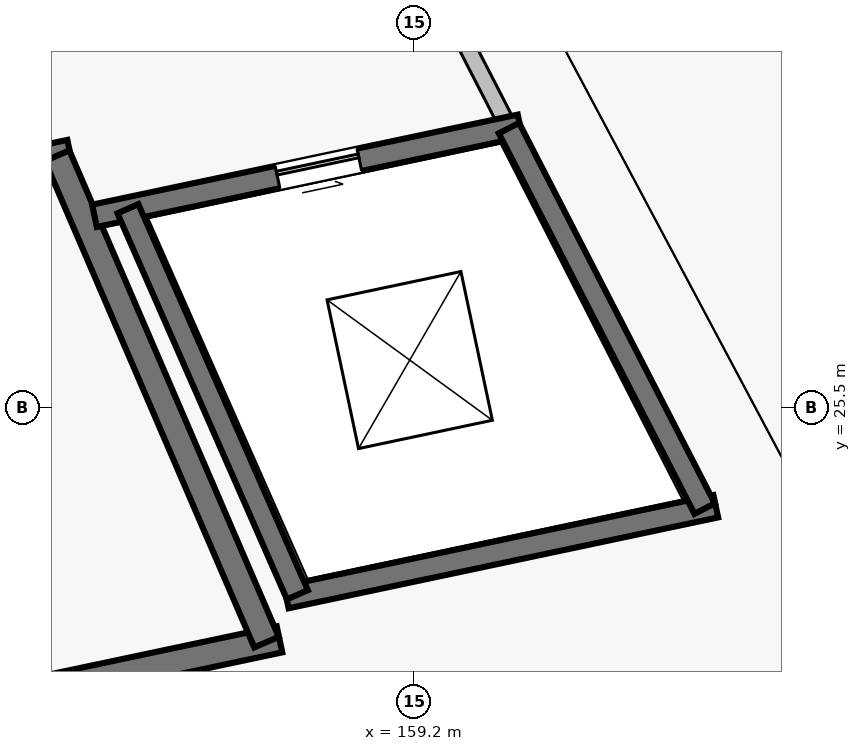
"""IFC4 building model, lengths in metres.
Left out: names, types, materials, properties, quantities, classifications, styles, units other than length and angle.
Written with IfcOpenShell. Run it as: python <this file> out.ifc"""

import sys

from ifc_helpers import new_model, si_unit, direction, frame, frame_2d, origin, place, context, subcontext, project, spatial, rectangle, extrude, element, fill, save


model = new_model("IFC4")
c1 = context("Model", 3, precision=1e-05, world=origin(), true_north=direction((0.0, 1.0)))
c2 = subcontext(c1, "Body", "Model", "MODEL_VIEW")
j1 = project(units=[si_unit("LENGTHUNIT", "METRE"), si_unit("PLANEANGLEUNIT", "RADIAN")], contexts=[c1])
p1 = place(None, origin())
s1 = spatial("IfcSite", under=j1, at=p1, CompositionType="ELEMENT")
p2 = place(p1, origin())
s2 = spatial("IfcBuilding", under=s1, at=p2, CompositionType="ELEMENT")
p3 = place(p2, origin())
s3 = spatial("IfcBuildingStorey", under=s2, at=p3, CompositionType="ELEMENT", Elevation=0.0)
p4 = place(p3, frame((142.896, 26.357, 0.0), z_axis=(0.0, 0.0, 1.0), x_axis=(0.978345203961, 0.206979858648, 0.0)))
e1 = element("IfcWall", 1, at=p4, inside=s3, PredefinedType="SHEAR", context=c2, shape_type="SweptSolid", body=[
    extrude(rectangle(XDim=12.044, YDim=0.35, at=frame_2d((6.022, 0.0))), origin(), (0.0, 0.0, 1.0), 5.5),
])
p5 = place(p4, frame((0.475, 0.0, 0.0)))
e2 = element("IfcOpeningElement", 2, at=p5, cuts=e1, PredefinedType="OPENING", context=c2, shape_type="SweptSolid", body=[
    extrude(rectangle(XDim=1.8, YDim=2.2, at=frame_2d((0.9, 1.1))), frame((0.0, 0.185, 0.0), z_axis=(0.0, -1.0, 0.0), x_axis=(1.0, 0.0, 0.0)), (0.0, 0.0, 1.0), 0.37),
])
p6 = place(p3, frame((144.65, 19.746, 0.0), z_axis=(0.0, 0.0, 1.0), x_axis=(0.978345119536, 0.206980257705, 0.0)))
e3 = element("IfcWall", 3, at=p6, inside=s3, PredefinedType="SHEAR", context=c2, shape_type="SweptSolid", body=[
    extrude(rectangle(XDim=13.067, YDim=0.35, at=frame_2d((6.533, 0.0))), origin(), (0.0, 0.0, 1.0), 5.5),
])
p7 = place(p6, frame((0.582, 0.0, 0.0)))
e4 = element("IfcOpeningElement", 4, at=p7, cuts=e3, PredefinedType="OPENING", context=c2, shape_type="SweptSolid", body=[
    extrude(rectangle(XDim=1.8, YDim=2.2, at=frame_2d((0.9, 1.1))), frame((0.0, 0.185, 0.0), z_axis=(0.0, -1.0, 0.0), x_axis=(1.0, 0.0, 0.0)), (0.0, 0.0, 1.0), 0.37),
])
p8 = place(p3, frame((154.508, 28.814, 0.0), z_axis=(0.0, 0.0, 1.0), x_axis=(0.395453834155, -0.918485854574, 0.0)))
e5 = element("IfcWall", 5, at=p8, inside=s3, PredefinedType="SHEAR", context=c2, shape_type="SweptSolid", body=[
    extrude(rectangle(XDim=6.968, YDim=0.35, at=frame_2d((3.484, 0.0))), origin(), (0.0, 0.0, 1.0), 5.5),
])
p9 = place(p3, frame((154.999, 28.023, 0.0), z_axis=(0.0, 0.0, 1.0), x_axis=(0.978345218992, 0.206979787601, 0.0)))
e6 = element("IfcWall", 6, at=p9, inside=s3, PredefinedType="SHEAR", context=c2, shape_type="SweptSolid", body=[
    extrude(rectangle(XDim=5.724, YDim=0.3, at=frame_2d((2.862, 0.0))), origin(), (0.0, 0.0, 1.0), 5.5),
])
p10 = place(p9, frame((2.462, 0.0, 0.0)))
e7 = element("IfcOpeningElement", 7, at=p10, cuts=e6, PredefinedType="OPENING", context=c2, shape_type="SweptSolid", body=[
    extrude(rectangle(XDim=1.1, YDim=2.2, at=frame_2d((0.55, 1.1))), frame((0.0, 0.16, 0.0), z_axis=(0.0, -1.0, 0.0), x_axis=(1.0, 0.0, 0.0)), (0.0, 0.0, 1.0), 0.32),
])
p11 = place(p3, frame((157.523, 23.006, 0.0), z_axis=(0.0, 0.0, 1.0), x_axis=(0.978347069901, 0.206971038591, 0.0)))
e8 = element("IfcWall", 8, at=p11, inside=s3, PredefinedType="SHEAR", context=c2, shape_type="SweptSolid", body=[
    extrude(rectangle(XDim=5.776, YDim=0.3, at=frame_2d((2.888, 0.0))), origin(), (0.0, 0.0, 1.0), 5.5),
])
p12 = place(p3, frame((155.44, 28.116, 0.0), z_axis=(0.0, 0.0, 1.0), x_axis=(0.402005363577, -0.915637312289, 0.0)))
e9 = element("IfcWall", 9, at=p12, inside=s3, PredefinedType="SHEAR", context=c2, shape_type="SweptSolid", body=[
    extrude(rectangle(XDim=5.547, YDim=0.3, at=frame_2d((2.773, 0.0))), origin(), (0.0, 0.0, 1.0), 5.5),
])
p13 = place(p3, frame((160.453, 29.177, 0.0), z_axis=(0.0, 0.0, 1.0), x_axis=(0.457368592987, -0.889277217829, 0.0)))
e10 = element("IfcWall", 10, at=p13, inside=s3, PredefinedType="SHEAR", context=c2, shape_type="SweptSolid", body=[
    extrude(rectangle(XDim=5.629, YDim=0.3, at=frame_2d((2.814, 0.0))), origin(), (0.0, 0.0, 1.0), 5.5),
])
p14 = place(p3, frame((142.284, 28.914, 0.0), z_axis=(0.0, 0.0, 1.0), x_axis=(0.97834522483, 0.206979760008, 0.0)))
e11 = element("IfcWall", 11, at=p14, inside=s3, PredefinedType="SOLIDWALL", context=c2, shape_type="SweptSolid", body=[
    extrude(rectangle(XDim=16.983, YDim=0.22, at=frame_2d((8.491, 0.0))), origin(), (0.0, 0.0, 1.0), 4.448),
])
p15 = place(p14, frame((6.903, 0.0, 0.0)))
e12 = element("IfcOpeningElement", 12, at=p15, cuts=e11, PredefinedType="OPENING", context=c2, shape_type="SweptSolid", body=[
    extrude(rectangle(XDim=1.5, YDim=2.2, at=frame_2d((0.75, 1.1))), frame((0.0, 0.12, 0.0), z_axis=(0.0, -1.0, 0.0), x_axis=(1.0, 0.0, 0.0)), (0.0, 0.0, 1.0), 0.24),
])
p16 = place(p3, frame((158.792, 32.406, 0.0), z_axis=(0.0, 0.0, 1.0), x_axis=(0.457349531643, -0.889287021105, 0.0)))
e13 = element("IfcWall", 13, at=p16, inside=s3, PredefinedType="SOLIDWALL", context=c2, shape_type="SweptSolid", body=[
    extrude(rectangle(XDim=3.632, YDim=0.22, at=frame_2d((1.816, 0.0))), origin(), (0.0, 0.0, 1.0), 5.5),
])
p17 = place(p10, origin())
e14 = element("IfcDoor", 14, at=p17, inside=s3, OperationType="SLIDING_TO_RIGHT", PredefinedType="DOOR", context=c2, shape_type="SweptSolid", body=[
    extrude(rectangle(XDim=1.1, YDim=2.2, at=frame_2d((0.55, 1.1))), frame((0.0, 0.025, 0.0), z_axis=(0.0, -1.0, 0.0), x_axis=(1.0, 0.0, 0.0)), (0.0, 0.0, 1.0), 0.05),
])
fill(e7, e14)
save(model, sys.argv[1])
